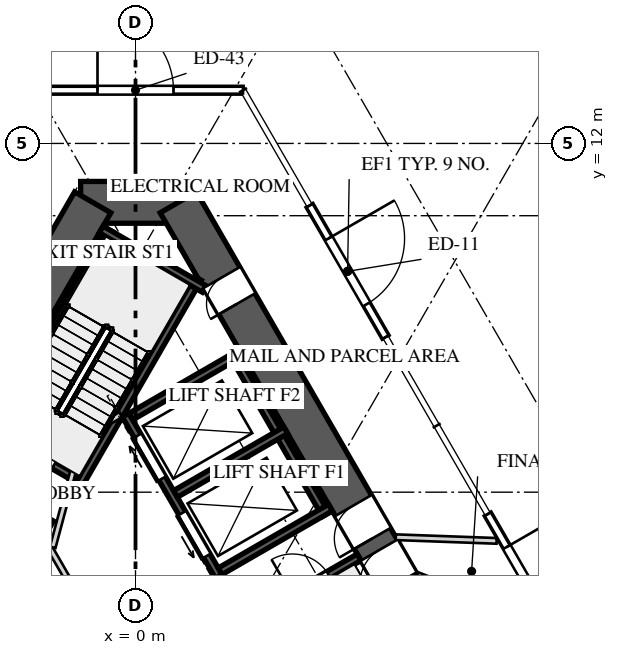
"""IFC4 building model, lengths in metres.
Left out: names, types, materials, properties, quantities, classifications, styles, units other than length and angle.
Written with IfcOpenShell. Run it as: python <this file> out.ifc"""

import sys

from ifc_helpers import new_model, si_unit, direction, frame, frame_2d, origin, place, context, subcontext, project, spatial, rectangle, extrude, element, fill, save


model = new_model("IFC4")
c1 = context("Model", 3, precision=1e-05, world=origin(), true_north=direction((0.0, 1.0)))
c2 = subcontext(c1, "Body", "Model", "MODEL_VIEW")
j1 = project(units=[si_unit("LENGTHUNIT", "METRE"), si_unit("PLANEANGLEUNIT", "RADIAN")], contexts=[c1])
p1 = place(None, origin())
s1 = spatial("IfcSite", under=j1, at=p1, CompositionType="ELEMENT")
p2 = place(p1, origin())
s2 = spatial("IfcBuilding", under=s1, at=p2, CompositionType="ELEMENT")
p3 = place(p2, origin())
s3 = spatial("IfcBuildingStorey", under=s2, at=p3, CompositionType="ELEMENT", Elevation=0.0)
p4 = place(p3, frame((1.443, 10.45, 0.0), z_axis=(0.0, 0.0, 1.0), x_axis=(-1.0, 0.0, 0.0)))
e1 = element("IfcWall", 1, at=p4, inside=s3, PredefinedType="SHEAR", context=c2, shape_type="SweptSolid", body=[
    extrude(rectangle(XDim=2.887, YDim=1.1, at=frame_2d((1.443, 0.0))), origin(), (0.0, 0.0, 1.0), 10.0),
])
p5 = place(p3, frame((-1.126, 10.45, 0.0), z_axis=(0.0, 0.0, 1.0), x_axis=(-0.500001757713, -0.866024388966, 0.0)))
e2 = element("IfcWall", 2, at=p5, inside=s3, PredefinedType="SHEAR", context=c2, shape_type="SweptSolid", body=[
    extrude(rectangle(XDim=16.974, YDim=1.1, at=frame_2d((8.487, 0.0))), origin(), (0.0, 0.0, 1.0), 10.0),
])
p6 = place(p5, frame((5.407, 0.0, 0.0)))
e3 = element("IfcOpeningElement", 3, at=p6, cuts=e2, PredefinedType="OPENING", context=c2, shape_type="SweptSolid", body=[
    extrude(rectangle(XDim=1.0, YDim=2.4, at=frame_2d((0.5, 1.2))), frame((0.0, 0.56, 0.0), z_axis=(0.0, -1.0, 0.0), x_axis=(1.0, 0.0, 0.0)), (0.0, 0.0, 1.0), 1.12),
])
p7 = place(p5, frame((6.692, 0.0, 0.0)))
e4 = element("IfcOpeningElement", 4, at=p7, cuts=e2, PredefinedType="OPENING", context=c2, shape_type="SweptSolid", body=[
    extrude(rectangle(XDim=1.0, YDim=2.4, at=frame_2d((0.5, 1.2))), frame((0.0, 0.56, 0.0), z_axis=(0.0, -1.0, 0.0), x_axis=(1.0, 0.0, 0.0)), (0.0, 0.0, 1.0), 1.12),
])
p8 = place(p3, frame((9.613, -4.25, 0.0), z_axis=(0.0, 0.0, 1.0), x_axis=(-0.500001757713, 0.866024388966, 0.0)))
e5 = element("IfcWall", 5, at=p8, inside=s3, PredefinedType="SHEAR", context=c2, shape_type="SweptSolid", body=[
    extrude(rectangle(XDim=16.974, YDim=1.1, at=frame_2d((8.487, 0.0))), origin(), (0.0, 0.0, 1.0), 10.0),
])
p9 = place(p8, frame((5.407, 0.0, 0.0)))
e6 = element("IfcOpeningElement", 6, at=p9, cuts=e5, PredefinedType="OPENING", context=c2, shape_type="SweptSolid", body=[
    extrude(rectangle(XDim=1.0, YDim=2.4, at=frame_2d((0.5, 1.2))), frame((0.0, 0.56, 0.0), z_axis=(0.0, -1.0, 0.0), x_axis=(1.0, 0.0, 0.0)), (0.0, 0.0, 1.0), 1.12),
])
p10 = place(p8, frame((6.762, 0.0, 0.0)))
e7 = element("IfcOpeningElement", 7, at=p10, cuts=e5, PredefinedType="OPENING", context=c2, shape_type="SweptSolid", body=[
    extrude(rectangle(XDim=1.0, YDim=2.4, at=frame_2d((0.5, 1.2))), frame((0.0, 0.56, 0.0), z_axis=(0.0, -1.0, 0.0), x_axis=(1.0, 0.0, 0.0)), (0.0, 0.0, 1.0), 1.12),
])
p11 = place(p8, frame((13.889, 0.0, 0.0)))
e8 = element("IfcOpeningElement", 8, at=p11, cuts=e5, PredefinedType="OPENING", context=c2, shape_type="SweptSolid", body=[
    extrude(rectangle(XDim=0.8, YDim=2.1, at=frame_2d((0.4, 1.05))), frame((0.0, 0.56, 0.0), z_axis=(0.0, -1.0, 0.0), x_axis=(1.0, 0.0, 0.0)), (0.0, 0.0, 1.0), 1.12),
])
p12 = place(p3, frame((4.58, 10.366, 0.0), z_axis=(0.0, 0.0, 1.0), x_axis=(0.49999894854, -0.866026010844, 0.0)))
e9 = element("IfcWall", 9, at=p12, inside=s3, PredefinedType="STANDARD", context=c2, shape_type="SweptSolid", body=[
    extrude(rectangle(XDim=4.0, YDim=0.2, at=frame_2d((2.0, 0.0))), origin(), (0.0, 0.0, 1.0), 4.0),
])
p13 = place(p12, frame((1.0, 0.0, 0.0)))
e10 = element("IfcOpeningElement", 10, at=p13, cuts=e9, PredefinedType="OPENING", context=c2, shape_type="SweptSolid", body=[
    extrude(rectangle(XDim=2.0, YDim=2.6, at=frame_2d((1.0, 1.3))), frame((0.0, 0.11, 0.0), z_axis=(0.0, -1.0, 0.0), x_axis=(1.0, 0.0, 0.0)), (0.0, 0.0, 1.0), 0.22),
])
p14 = place(p3, frame((9.268, 2.248, 0.0), z_axis=(0.0, 0.0, 1.0), x_axis=(0.49999894854, -0.866026010844, 0.0)))
e11 = element("IfcWall", 11, at=p14, inside=s3, PredefinedType="STANDARD", context=c2, shape_type="SweptSolid", body=[
    extrude(rectangle(XDim=4.0, YDim=0.2, at=frame_2d((2.0, 0.0))), origin(), (0.0, 0.0, 1.0), 4.0),
])
p15 = place(p14, frame((1.0, 0.0, 0.0)))
e12 = element("IfcOpeningElement", 12, at=p15, cuts=e11, PredefinedType="OPENING", context=c2, shape_type="SweptSolid", body=[
    extrude(rectangle(XDim=2.0, YDim=2.6, at=frame_2d((1.0, 1.3))), frame((0.0, 0.11, 0.0), z_axis=(0.0, -1.0, 0.0), x_axis=(1.0, 0.0, 0.0)), (0.0, 0.0, 1.0), 0.22),
])
p16 = place(p3, frame((-2.829, 13.4, 0.0), z_axis=(0.0, 0.0, 1.0), x_axis=(1.0, 0.0, 0.0)))
e13 = element("IfcWall", 13, at=p16, inside=s3, PredefinedType="STANDARD", context=c2, shape_type="SweptSolid", body=[
    extrude(rectangle(XDim=5.658, YDim=0.2, at=frame_2d((2.829, 0.0))), origin(), (0.0, 0.0, 1.0), 4.0),
])
p17 = place(p16, frame((1.829, 0.0, 0.0)))
e14 = element("IfcOpeningElement", 14, at=p17, cuts=e13, PredefinedType="OPENING", context=c2, shape_type="SweptSolid", body=[
    extrude(rectangle(XDim=2.0, YDim=2.6, at=frame_2d((1.0, 1.3))), frame((0.0, 0.11, 0.0), z_axis=(0.0, -1.0, 0.0), x_axis=(1.0, 0.0, 0.0)), (0.0, 0.0, 1.0), 0.22),
])
p18 = place(p3, frame((-0.68, 9.722, 0.0), z_axis=(0.0, 0.0, 1.0), x_axis=(-0.499974350878, -0.866040211805, 0.0)))
e15 = element("IfcWall", 15, at=p18, inside=s3, PredefinedType="SOLIDWALL", context=c2, shape_type="SweptSolid", body=[
    extrude(rectangle(XDim=4.95, YDim=0.2, at=frame_2d((2.475, 0.0))), origin(), (0.0, 0.0, 1.0), 9.65),
])
p19 = place(p3, frame((1.646, 8.45, 0.0), z_axis=(0.0, 0.0, 1.0), x_axis=(-0.500006002103, -0.866021938441, 0.0)))
e16 = element("IfcWall", 16, at=p19, inside=s3, PredefinedType="SOLIDWALL", context=c2, shape_type="SweptSolid", body=[
    extrude(rectangle(XDim=6.261, YDim=0.2, at=frame_2d((3.13, 0.0))), origin(), (0.0, 0.0, 1.0), 9.65),
])
p20 = place(p3, frame((1.806, 8.172, 0.0), z_axis=(0.0, 0.0, 1.0), x_axis=(-0.866054327916, 0.499949898588, 0.0)))
e17 = element("IfcWall", 17, at=p20, inside=s3, PredefinedType="SOLIDWALL", context=c2, shape_type="SweptSolid", body=[
    extrude(rectangle(XDim=3.128, YDim=0.2, at=frame_2d((1.564, 0.0))), origin(), (0.0, 0.0, 1.0), 9.65),
])
p21 = place(p3, frame((-1.521, 3.165, 0.0), z_axis=(0.0, 0.0, 1.0), x_axis=(-0.866027397988, 0.499996545922, 0.0)))
e18 = element("IfcWall", 18, at=p21, inside=s3, PredefinedType="SOLIDWALL", context=c2, shape_type="SweptSolid", body=[
    extrude(rectangle(XDim=2.75, YDim=0.2, at=frame_2d((1.375, 0.0))), origin(), (0.0, 0.0, 1.0), 9.65),
])
p22 = place(p21, frame((0.725, 0.0, 0.0)))
e19 = element("IfcOpeningElement", 19, at=p22, cuts=e18, PredefinedType="OPENING", context=c2, shape_type="SweptSolid", body=[
    extrude(rectangle(XDim=1.1, YDim=2.4, at=frame_2d((0.55, 1.2))), frame((0.0, 0.11, 0.0), z_axis=(0.0, -1.0, 0.0), x_axis=(1.0, 0.0, 0.0)), (0.0, 0.0, 1.0), 0.22),
])
p23 = place(p3, frame((3.501, -0.265, 0.0), z_axis=(0.0, 0.0, 1.0), x_axis=(0.866027397988, 0.499996545922, 0.0)))
e20 = element("IfcWall", 20, at=p23, inside=s3, PredefinedType="SOLIDWALL", context=c2, shape_type="SweptSolid", body=[
    extrude(rectangle(XDim=2.75, YDim=0.2, at=frame_2d((1.375, 0.0))), origin(), (0.0, 0.0, 1.0), 9.65),
])
p24 = place(p23, frame((0.725, 0.0, 0.0)))
e21 = element("IfcOpeningElement", 21, at=p24, cuts=e20, PredefinedType="OPENING", context=c2, shape_type="SweptSolid", body=[
    extrude(rectangle(XDim=1.1, YDim=2.4, at=frame_2d((0.55, 1.2))), frame((0.0, 0.11, 0.0), z_axis=(0.0, -1.0, 0.0), x_axis=(1.0, 0.0, 0.0)), (0.0, 0.0, 1.0), 0.22),
])
p25 = place(p3, frame((-4.993, -2.648, 0.0), z_axis=(0.0, 0.0, 1.0), x_axis=(0.499996545922, 0.866027397988, 0.0)))
e22 = element("IfcWall", 22, at=p25, inside=s3, PredefinedType="SOLIDWALL", context=c2, shape_type="SweptSolid", body=[
    extrude(rectangle(XDim=5.5, YDim=0.2, at=frame_2d((2.75, 0.0))), origin(), (0.0, 0.0, 1.0), 9.65),
])
p26 = place(p25, frame((3.12, 0.0, 0.0)))
e23 = element("IfcOpeningElement", 23, at=p26, cuts=e22, PredefinedType="OPENING", context=c2, shape_type="SweptSolid", body=[
    extrude(rectangle(XDim=0.95, YDim=2.4, at=frame_2d((0.475, 1.2))), frame((0.0, 0.11, 0.0), z_axis=(0.0, -1.0, 0.0), x_axis=(1.0, 0.0, 0.0)), (0.0, 0.0, 1.0), 0.22),
])
p27 = place(p25, frame((0.605, 0.0, 0.0)))
e24 = element("IfcOpeningElement", 24, at=p27, cuts=e22, PredefinedType="OPENING", context=c2, shape_type="SweptSolid", body=[
    extrude(rectangle(XDim=0.8, YDim=2.1, at=frame_2d((0.4, 1.05))), frame((0.0, 0.11, 0.0), z_axis=(0.0, -1.0, 0.0), x_axis=(1.0, 0.0, 0.0)), (0.0, 0.0, 1.0), 0.22),
])
p28 = place(p3, frame((2.19, 0.606, 0.0), z_axis=(0.0, 0.0, 1.0), x_axis=(-0.500002801628, 0.866023786258, 0.0)))
e25 = element("IfcWall", 25, at=p28, inside=s3, PredefinedType="SOLIDWALL", context=c2, shape_type="SweptSolid", body=[
    extrude(rectangle(XDim=4.9, YDim=0.2, at=frame_2d((2.45, 0.0))), origin(), (0.0, 0.0, 1.0), 9.65),
])
p29 = place(p28, frame((0.625, 0.0, 0.0)))
e26 = element("IfcOpeningElement", 26, at=p29, cuts=e25, PredefinedType="OPENING", context=c2, shape_type="SweptSolid", body=[
    extrude(rectangle(XDim=1.3, YDim=2.1, at=frame_2d((0.65, 1.05))), frame((0.0, 0.11, 0.0), z_axis=(0.0, -1.0, 0.0), x_axis=(1.0, 0.0, 0.0)), (0.0, 0.0, 1.0), 0.22),
])
p30 = place(p28, frame((2.975, 0.0, 0.0)))
e27 = element("IfcOpeningElement", 27, at=p30, cuts=e25, PredefinedType="OPENING", context=c2, shape_type="SweptSolid", body=[
    extrude(rectangle(XDim=1.3, YDim=2.1, at=frame_2d((0.65, 1.05))), frame((0.0, 0.11, 0.0), z_axis=(0.0, -1.0, 0.0), x_axis=(1.0, 0.0, 0.0)), (0.0, 0.0, 1.0), 0.22),
])
p31 = place(p3, frame((5.005, 2.231, 0.0), z_axis=(0.0, 0.0, 1.0), x_axis=(-0.500002801628, 0.866023786258, 0.0)))
e28 = element("IfcWall", 28, at=p31, inside=s3, PredefinedType="SOLIDWALL", context=c2, shape_type="SweptSolid", body=[
    extrude(rectangle(XDim=4.9, YDim=0.2, at=frame_2d((2.45, 0.0))), origin(), (0.0, 0.0, 1.0), 9.65),
])
p32 = place(p3, frame((2.227, 0.743, 0.0), z_axis=(0.0, 0.0, 1.0), x_axis=(0.866014461049, 0.500018952895, 0.0)))
e29 = element("IfcWall", 29, at=p32, inside=s3, PredefinedType="SOLIDWALL", context=c2, shape_type="SweptSolid", body=[
    extrude(rectangle(XDim=3.35, YDim=0.2, at=frame_2d((1.675, 0.0))), origin(), (0.0, 0.0, 1.0), 9.65),
])
p33 = place(p3, frame((1.052, 2.778, 0.0), z_axis=(0.0, 0.0, 1.0), x_axis=(0.866032680314, 0.499987396469, 0.0)))
e30 = element("IfcWall", 30, at=p33, inside=s3, PredefinedType="SOLIDWALL", context=c2, shape_type="SweptSolid", body=[
    extrude(rectangle(XDim=3.35, YDim=0.2, at=frame_2d((1.675, 0.0))), origin(), (0.0, 0.0, 1.0), 9.65),
])
p34 = place(p3, frame((-0.123, 4.813, 0.0), z_axis=(0.0, 0.0, 1.0), x_axis=(0.866014461049, 0.500018952895, 0.0)))
e31 = element("IfcWall", 31, at=p34, inside=s3, PredefinedType="SOLIDWALL", context=c2, shape_type="SweptSolid", body=[
    extrude(rectangle(XDim=3.35, YDim=0.2, at=frame_2d((1.675, 0.0))), origin(), (0.0, 0.0, 1.0), 9.65),
])
p35 = place(p3, frame((7.423, 0.643, 0.0), z_axis=(0.0, 0.0, 1.0), x_axis=(0.931641653134, -0.363378356738, 0.0)))
e32 = element("IfcWall", 32, at=p35, inside=s3, PredefinedType="PARTITIONING", context=c2, shape_type="SweptSolid", body=[
    extrude(rectangle(XDim=1.858, YDim=0.15, at=frame_2d((0.929, 0.0))), origin(), (0.0, 0.0, 1.0), 9.65),
])
p36 = place(p3, frame((6.848, 1.639, 0.0), z_axis=(0.0, 0.0, 1.0), x_axis=(0.999343619738, -0.036226091285, 0.0)))
e33 = element("IfcWall", 33, at=p36, inside=s3, PredefinedType="PARTITIONING", context=c2, shape_type="SweptSolid", body=[
    extrude(rectangle(XDim=2.655, YDim=0.15, at=frame_2d((1.328, 0.0))), origin(), (0.0, 0.0, 1.0), 9.65),
])
p37 = place(p3, frame((-0.744, -1.261, 0.0), z_axis=(0.0, 0.0, 1.0), x_axis=(-0.500004234368, 0.866022959057, 0.0)))
e34 = element("IfcWall", 34, at=p37, inside=s3, PredefinedType="PARTITIONING", context=c2, shape_type="SweptSolid", body=[
    extrude(rectangle(XDim=3.125, YDim=0.15, at=frame_2d((1.562, 0.0))), origin(), (0.0, 0.0, 1.0), 9.65),
])
p38 = place(p37, frame((1.05, 0.0, 0.0)))
e35 = element("IfcOpeningElement", 35, at=p38, cuts=e34, PredefinedType="OPENING", context=c2, shape_type="SweptSolid", body=[
    extrude(rectangle(XDim=1.1, YDim=2.4, at=frame_2d((0.55, 1.2))), frame((0.0, 0.085, 0.0), z_axis=(0.0, -1.0, 0.0), x_axis=(1.0, 0.0, 0.0)), (0.0, 0.0, 1.0), 0.17),
])
p39 = place(p3, frame((-2.178, 1.372, 0.0), z_axis=(0.0, 0.0, 1.0), x_axis=(0.258808958833, 0.96592852884, 0.0)))
e36 = element("IfcWall", 36, at=p39, inside=s3, PredefinedType="PARTITIONING", context=c2, shape_type="SweptSolid", body=[
    extrude(rectangle(XDim=2.903, YDim=0.15, at=frame_2d((1.451, 0.0))), origin(), (0.0, 0.0, 1.0), 9.65),
])
p40 = place(p3, frame((-1.51, 4.215, 0.0), z_axis=(0.0, 0.0, 1.0), x_axis=(0.866085525409, 0.49989585183, 0.0)))
e37 = element("IfcWall", 37, at=p40, inside=s3, PredefinedType="PARTITIONING", context=c2, shape_type="SweptSolid", body=[
    extrude(rectangle(XDim=1.3, YDim=0.15, at=frame_2d((0.65, 0.0))), origin(), (0.0, 0.0, 1.0), 9.65),
])
p41 = place(p13, origin())
e38 = element("IfcDoor", 38, at=p41, inside=s3, OperationType="DOUBLE_DOOR_SINGLE_SWING", PredefinedType="DOOR", context=c2, shape_type="SweptSolid", body=[
    extrude(rectangle(XDim=2.0, YDim=2.6, at=frame_2d((1.0, 1.3))), frame((0.0, 0.025, 0.0), z_axis=(0.0, -1.0, 0.0), x_axis=(1.0, 0.0, 0.0)), (0.0, 0.0, 1.0), 0.05),
])
fill(e10, e38)
p42 = place(p15, origin())
e39 = element("IfcDoor", 39, at=p42, inside=s3, OperationType="DOUBLE_DOOR_SINGLE_SWING", PredefinedType="DOOR", context=c2, shape_type="SweptSolid", body=[
    extrude(rectangle(XDim=2.0, YDim=2.6, at=frame_2d((1.0, 1.3))), frame((0.0, 0.025, 0.0), z_axis=(0.0, -1.0, 0.0), x_axis=(1.0, 0.0, 0.0)), (0.0, 0.0, 1.0), 0.05),
])
fill(e12, e39)
p43 = place(p17, origin())
e40 = element("IfcDoor", 40, at=p43, inside=s3, OperationType="DOUBLE_DOOR_SINGLE_SWING", PredefinedType="DOOR", context=c2, shape_type="SweptSolid", body=[
    extrude(rectangle(XDim=2.0, YDim=2.6, at=frame_2d((1.0, 1.3))), frame((0.0, 0.025, 0.0), z_axis=(0.0, -1.0, 0.0), x_axis=(1.0, 0.0, 0.0)), (0.0, 0.0, 1.0), 0.05),
])
fill(e14, e40)
p44 = place(p22, origin())
e41 = element("IfcDoor", 41, at=p44, inside=s3, OperationType="SINGLE_SWING_RIGHT", PredefinedType="DOOR", context=c2, shape_type="SweptSolid", body=[
    extrude(rectangle(XDim=1.1, YDim=2.4, at=frame_2d((0.55, 1.2))), frame((0.0, 0.025, 0.0), z_axis=(0.0, -1.0, 0.0), x_axis=(1.0, 0.0, 0.0)), (0.0, 0.0, 1.0), 0.05),
])
fill(e19, e41)
p45 = place(p24, origin())
e42 = element("IfcDoor", 42, at=p45, inside=s3, OperationType="SINGLE_SWING_RIGHT", PredefinedType="DOOR", context=c2, shape_type="SweptSolid", body=[
    extrude(rectangle(XDim=1.1, YDim=2.4, at=frame_2d((0.55, 1.2))), frame((0.0, 0.025, 0.0), z_axis=(0.0, -1.0, 0.0), x_axis=(1.0, 0.0, 0.0)), (0.0, 0.0, 1.0), 0.05),
])
fill(e21, e42)
p46 = place(p29, origin())
e43 = element("IfcDoor", 43, at=p46, inside=s3, OperationType="SLIDING_TO_LEFT", PredefinedType="DOOR", context=c2, shape_type="SweptSolid", body=[
    extrude(rectangle(XDim=1.3, YDim=2.1, at=frame_2d((0.65, 1.05))), frame((0.0, 0.025, 0.0), z_axis=(0.0, -1.0, 0.0), x_axis=(1.0, 0.0, 0.0)), (0.0, 0.0, 1.0), 0.05),
])
fill(e26, e43)
p47 = place(p30, origin())
e44 = element("IfcDoor", 44, at=p47, inside=s3, OperationType="SLIDING_TO_RIGHT", PredefinedType="DOOR", context=c2, shape_type="SweptSolid", body=[
    extrude(rectangle(XDim=1.3, YDim=2.1, at=frame_2d((0.65, 1.05))), frame((0.0, 0.025, 0.0), z_axis=(0.0, -1.0, 0.0), x_axis=(1.0, 0.0, 0.0)), (0.0, 0.0, 1.0), 0.05),
])
fill(e27, e44)
p48 = place(p9, origin())
e45 = element("IfcDoor", 45, at=p48, inside=s3, OperationType="SINGLE_SWING_LEFT", PredefinedType="DOOR", context=c2, shape_type="SweptSolid", body=[
    extrude(rectangle(XDim=1.0, YDim=2.4, at=frame_2d((0.5, 1.2))), frame((0.0, 0.025, 0.0), z_axis=(0.0, -1.0, 0.0), x_axis=(1.0, 0.0, 0.0)), (0.0, 0.0, 1.0), 0.05),
])
fill(e6, e45)
p49 = place(p10, origin())
e46 = element("IfcDoor", 46, at=p49, inside=s3, OperationType="SINGLE_SWING_LEFT", PredefinedType="DOOR", context=c2, shape_type="SweptSolid", body=[
    extrude(rectangle(XDim=1.0, YDim=2.4, at=frame_2d((0.5, 1.2))), frame((0.0, 0.025, 0.0), z_axis=(0.0, -1.0, 0.0), x_axis=(1.0, 0.0, 0.0)), (0.0, 0.0, 1.0), 0.05),
])
fill(e7, e46)
p50 = place(p11, origin())
e47 = element("IfcDoor", 47, at=p50, inside=s3, OperationType="SINGLE_SWING_LEFT", PredefinedType="DOOR", context=c2, shape_type="SweptSolid", body=[
    extrude(rectangle(XDim=0.8, YDim=2.1, at=frame_2d((0.4, 1.05))), frame((0.0, 0.025, 0.0), z_axis=(0.0, -1.0, 0.0), x_axis=(1.0, 0.0, 0.0)), (0.0, 0.0, 1.0), 0.05),
])
fill(e8, e47)
save(model, sys.argv[1])
